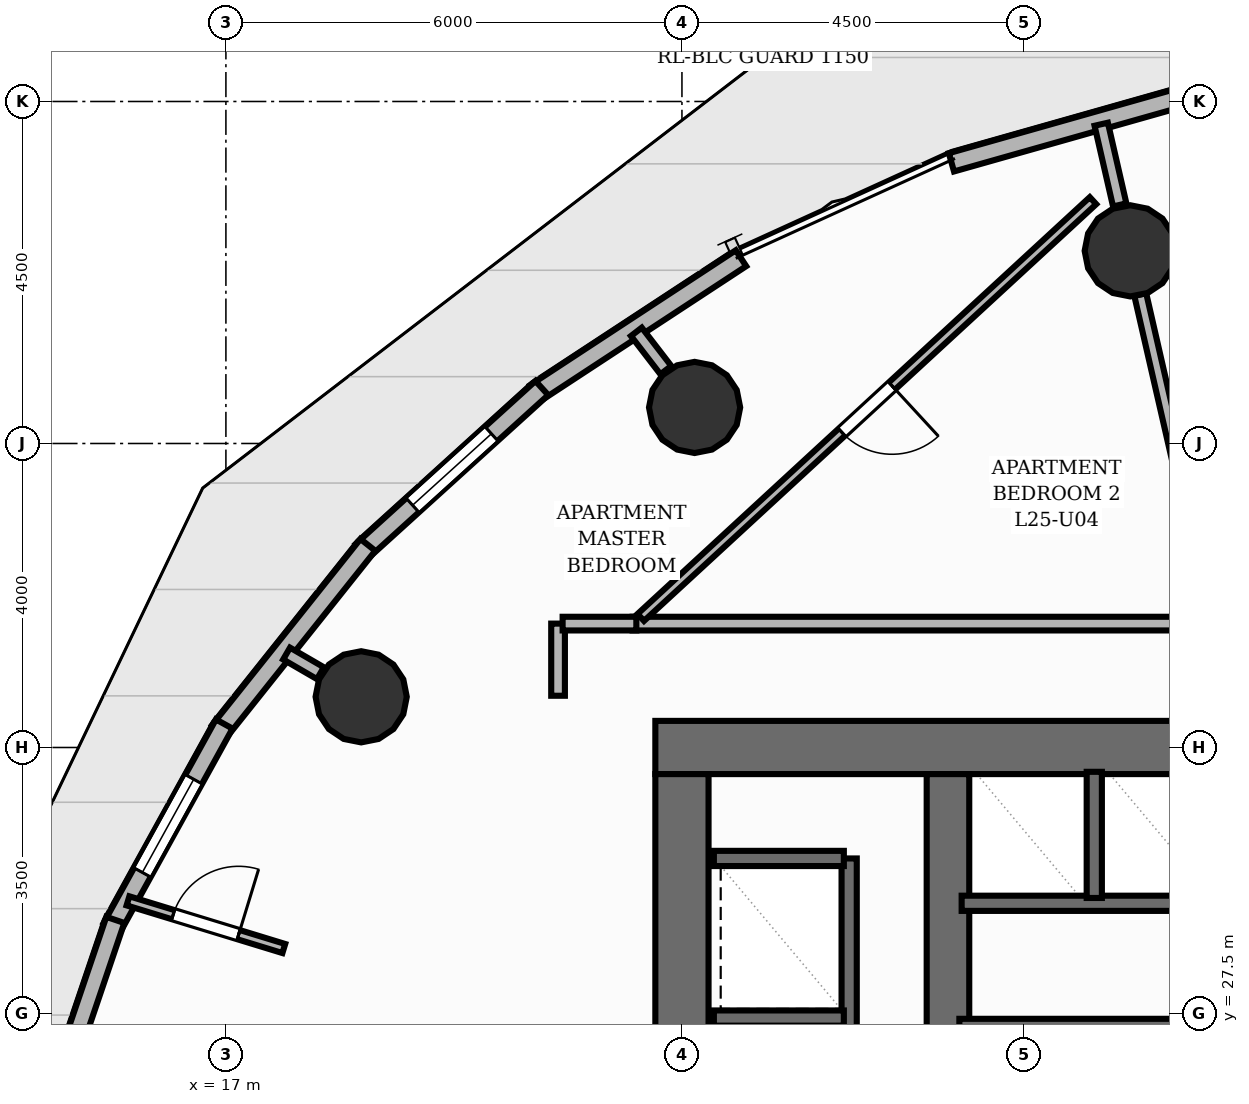
"""IFC4 building model, lengths in metres.
Left out: names, types, materials, properties, quantities, classifications, styles, units other than length and angle.
Written with IfcOpenShell. Run it as: python <this file> out.ifc"""

import sys

from ifc_helpers import new_model, si_unit, direction, frame, frame_2d, origin, origin_2d, place, context, subcontext, project, spatial, rectangle, circle, extrude, element, fill, save


model = new_model("IFC4")
c1 = context("Model", 3, precision=1e-05, world=origin(), true_north=direction((0.0, 1.0)))
c2 = subcontext(c1, "Body", "Model", "MODEL_VIEW")
j1 = project(units=[si_unit("LENGTHUNIT", "METRE"), si_unit("PLANEANGLEUNIT", "RADIAN")], contexts=[c1])
p1 = place(None, origin())
s1 = spatial("IfcSite", under=j1, at=p1, CompositionType="ELEMENT")
p2 = place(p1, origin())
s2 = spatial("IfcBuilding", under=s1, at=p2, CompositionType="ELEMENT")
p3 = place(p2, frame((0.0, 0.0, 86.88)))
s3 = spatial("IfcBuildingStorey", under=s2, at=p3, CompositionType="ELEMENT", Elevation=86.88)
p4 = place(p3, frame((22.65, 31.0, 0.0), z_axis=(0.0, 0.0, 1.0), x_axis=(1.0, 0.0, 0.0)))
e1 = element("IfcWall", 1, at=p4, inside=s3, PredefinedType="SHEAR", context=c2, shape_type="SweptSolid", body=[
    extrude(rectangle(XDim=18.7, YDim=0.7, at=frame_2d((9.35, 0.0))), origin(), (0.0, 0.0, 1.0), 3.2),
])
p5 = place(p4, frame((11.75, 0.0, 0.0)))
e2 = element("IfcOpeningElement", 2, at=p5, cuts=e1, PredefinedType="OPENING", context=c2, shape_type="SweptSolid", body=[
    extrude(rectangle(XDim=1.1, YDim=2.15, at=frame_2d((0.55, 1.075))), frame((0.0, 0.36, 0.0), z_axis=(0.0, -1.0, 0.0), x_axis=(1.0, 0.0, 0.0)), (0.0, 0.0, 1.0), 0.72),
])
p6 = place(p3, frame((23.0, 17.35, 0.0), z_axis=(0.0, 0.0, 1.0), x_axis=(0.0, 1.0, 0.0)))
e3 = element("IfcWall", 3, at=p6, inside=s3, PredefinedType="SHEAR", context=c2, shape_type="SweptSolid", body=[
    extrude(rectangle(XDim=13.3, YDim=0.7, at=frame_2d((6.65, 0.0))), origin(), (0.0, 0.0, 1.0), 3.2),
])
p7 = place(p3, frame((26.5, 17.35, 0.0), z_axis=(0.0, 0.0, 1.0), x_axis=(0.0, 1.0, 0.0)))
e4 = element("IfcWall", 4, at=p7, inside=s3, PredefinedType="SHEAR", context=c2, shape_type="SweptSolid", body=[
    extrude(rectangle(XDim=13.3, YDim=0.56, at=frame_2d((6.65, 0.0))), origin(), (0.0, 0.0, 1.0), 3.2),
])
for number, where, z_axis, x_axis in (
    (5, (28.898, 37.535, 0.0), (0.0, 0.0, 1.0), (1.0, 0.0, 0.0)),
    (6, (23.167, 35.474, 0.0), (0.0, 0.0, 1.0), (1.0, 0.0, 0.0)),
    (7, (18.78, 31.667, 0.0), (0.0, 0.0, 1.0), (1.0, 0.0, 0.0)),
):
    element("IfcColumn", number, at=place(p3, frame(where, z_axis=z_axis, x_axis=x_axis)), inside=s3, PredefinedType="COLUMN", context=c2, shape_type="SweptSolid", body=[
        extrude(circle(Radius=0.6, at=origin_2d()), origin(), (0.0, 0.0, 1.0), 3.2),
    ])
p8 = place(p3, frame((26.545, 38.699, 0.0), z_axis=(0.0, 0.0, 1.0), x_axis=(0.962134911526, 0.272573681825, 0.0)))
e8 = element("IfcWall", 8, at=p8, inside=s3, PredefinedType="SOLIDWALL", context=c2, shape_type="SweptSolid", body=[
    extrude(rectangle(XDim=3.26, YDim=0.25, at=frame_2d((1.63, 0.0))), origin(), (0.0, 0.0, 1.0), 2.96),
])
p9 = place(p3, frame((21.071, 35.663, 0.0), z_axis=(0.0, 0.0, 1.0), x_axis=(0.836273856728, 0.548311988336, 0.0)))
e9 = element("IfcWall", 9, at=p9, inside=s3, PredefinedType="SOLIDWALL", context=c2, shape_type="SweptSolid", body=[
    extrude(rectangle(XDim=3.236, YDim=0.25, at=frame_2d((1.618, 0.0))), origin(), (0.0, 0.0, 1.0), 2.96),
])
p10 = place(p3, frame((18.792, 33.586, 0.0), z_axis=(0.0, 0.0, 1.0), x_axis=(0.740832321657, 0.671690011232, 0.0)))
e10 = element("IfcWall", 10, at=p10, inside=s3, PredefinedType="SOLIDWALL", context=c2, shape_type="SweptSolid", body=[
    extrude(rectangle(XDim=3.192, YDim=0.25, at=frame_2d((1.596, 0.0))), origin(), (0.0, 0.0, 1.0), 2.96),
])
p11 = place(p10, frame((0.896, 0.0, 0.85)))
e11 = element("IfcOpeningElement", 11, at=p11, cuts=e10, PredefinedType="OPENING", context=c2, shape_type="SweptSolid", body=[
    extrude(rectangle(XDim=1.4, YDim=1.55, at=frame_2d((0.7, 0.775))), frame((0.0, 0.135, 0.0), z_axis=(0.0, -1.0, 0.0), x_axis=(1.0, 0.0, 0.0)), (0.0, 0.0, 1.0), 0.27),
])
p12 = place(p3, frame((16.916, 31.217, 0.0), z_axis=(0.0, 0.0, 1.0), x_axis=(0.623134406496, 0.782114768714, 0.0)))
e12 = element("IfcWall", 12, at=p12, inside=s3, PredefinedType="SOLIDWALL", context=c2, shape_type="SweptSolid", body=[
    extrude(rectangle(XDim=3.131, YDim=0.25, at=frame_2d((1.565, 0.0))), origin(), (0.0, 0.0, 1.0), 2.96),
])
p13 = place(p3, frame((15.5, 28.629, 0.0), z_axis=(0.0, 0.0, 1.0), x_axis=(0.482904421948, 0.875673066426, 0.0)))
e13 = element("IfcWall", 13, at=p13, inside=s3, PredefinedType="SOLIDWALL", context=c2, shape_type="SweptSolid", body=[
    extrude(rectangle(XDim=3.061, YDim=0.25, at=frame_2d((1.53, 0.0))), origin(), (0.0, 0.0, 1.0), 2.96),
])
p14 = place(p13, frame((0.83, 0.0, 0.85)))
e14 = element("IfcOpeningElement", 14, at=p14, cuts=e13, PredefinedType="OPENING", context=c2, shape_type="SweptSolid", body=[
    extrude(rectangle(XDim=1.4, YDim=1.55, at=frame_2d((0.7, 0.775))), frame((0.0, 0.135, 0.0), z_axis=(0.0, -1.0, 0.0), x_axis=(1.0, 0.0, 0.0)), (0.0, 0.0, 1.0), 0.27),
])
p15 = place(p3, frame((14.585, 25.901, 0.0), z_axis=(0.0, 0.0, 1.0), x_axis=(0.321149814784, 0.947028403198, 0.0)))
e15 = element("IfcWall", 15, at=p15, inside=s3, PredefinedType="SOLIDWALL", context=c2, shape_type="SweptSolid", body=[
    extrude(rectangle(XDim=2.988, YDim=0.25, at=frame_2d((1.494, 0.0))), origin(), (0.0, 0.0, 1.0), 2.96),
])
p16 = place(p3, frame((26.65, 27.33, 0.0), z_axis=(0.0, 0.0, 1.0), x_axis=(1.0, 0.0, 0.0)))
e16 = element("IfcWall", 16, at=p16, inside=s3, PredefinedType="SHEAR", context=c2, shape_type="SweptSolid", body=[
    extrude(rectangle(XDim=3.24, YDim=0.2, at=frame_2d((1.62, 0.0))), origin(), (0.0, 0.0, 1.0), 3.2),
])
p17 = place(p3, frame((25.2, 18.46, 0.0), z_axis=(0.0, 0.0, 1.0), x_axis=(0.0, 1.0, 0.0)))
e17 = element("IfcWall", 17, at=p17, inside=s3, PredefinedType="SHEAR", context=c2, shape_type="SweptSolid", body=[
    extrude(rectangle(XDim=11.08, YDim=0.2, at=frame_2d((5.54, 0.0))), origin(), (0.0, 0.0, 1.0), 3.2),
])
for number, where, z_axis, x_axis in (
    (18, (23.42, 29.54, 0.0), (0.0, 0.0, 1.0), (1.0, 0.0, 0.0)),
    (19, (23.42, 27.44, 0.0), (0.0, 0.0, 1.0), (1.0, 0.0, 0.0)),
):
    element("IfcWall", number, at=place(p3, frame(where, z_axis=z_axis, x_axis=x_axis)), inside=s3, PredefinedType="SHEAR", context=c2, shape_type="SweptSolid", body=[
        extrude(rectangle(XDim=1.71, YDim=0.2, at=frame_2d((0.855, 0.0))), origin(), (0.0, 0.0, 1.0), 3.2),
    ])
p18 = place(p3, frame((26.68, 28.95, 0.0), z_axis=(0.0, 0.0, 1.0), x_axis=(1.0, 0.0, 0.0)))
e20 = element("IfcWall", 20, at=p18, inside=s3, PredefinedType="SHEAR", context=c2, shape_type="SweptSolid", body=[
    extrude(rectangle(XDim=5.24, YDim=0.2, at=frame_2d((2.62, 0.0))), origin(), (0.0, 0.0, 1.0), 3.2),
])
p19 = place(p3, frame((28.425, 29.02, 0.0), z_axis=(0.0, 0.0, 1.0), x_axis=(0.0, 1.0, 0.0)))
e21 = element("IfcWall", 21, at=p19, inside=s3, PredefinedType="SHEAR", context=c2, shape_type="SweptSolid", body=[
    extrude(rectangle(XDim=1.66, YDim=0.2, at=frame_2d((0.83, 0.0))), origin(), (0.0, 0.0, 1.0), 3.2),
])
p20 = place(p3, frame((28.76, 38.139, 0.0), z_axis=(0.0, 0.0, 1.0), x_axis=(-0.223287406217, 0.974752652843, 0.0)))
e22 = element("IfcWall", 22, at=p20, inside=s3, PredefinedType="PARTITIONING", context=c2, shape_type="SweptSolid", body=[
    extrude(rectangle(XDim=1.089, YDim=0.18, at=frame_2d((0.544, 0.0))), origin(), (0.0, 0.0, 1.0), 2.261),
])
p21 = place(p3, frame((22.788, 35.966, 0.0), z_axis=(0.0, 0.0, 1.0), x_axis=(-0.609970610867, 0.792424036661, 0.0)))
e23 = element("IfcWall", 23, at=p21, inside=s3, PredefinedType="PARTITIONING", context=c2, shape_type="SweptSolid", body=[
    extrude(rectangle(XDim=0.635, YDim=0.18, at=frame_2d((0.318, 0.0))), origin(), (0.0, 0.0, 1.0), 2.261),
])
p22 = place(p3, frame((18.243, 31.978, 0.0), z_axis=(0.0, 0.0, 1.0), x_axis=(-0.864981735625, 0.501803344981, 0.0)))
e24 = element("IfcWall", 24, at=p22, inside=s3, PredefinedType="PARTITIONING", context=c2, shape_type="SweptSolid", body=[
    extrude(rectangle(XDim=0.514, YDim=0.18, at=frame_2d((0.257, 0.0))), origin(), (0.0, 0.0, 1.0), 2.261),
])
p23 = place(p3, frame((22.351, 32.63, 0.0), z_axis=(0.0, 0.0, 1.0), x_axis=(1.0, 0.0, 0.0)))
e25 = element("IfcWall", 25, at=p23, inside=s3, PredefinedType="PARTITIONING", context=c2, shape_type="SweptSolid", body=[
    extrude(rectangle(XDim=20.279, YDim=0.18, at=frame_2d((10.14, 0.0))), origin(), (0.0, 0.0, 1.0), 2.955),
])
p24 = place(p23, frame((11.378, 0.0, 0.0)))
e26 = element("IfcOpeningElement", 26, at=p24, cuts=e25, PredefinedType="OPENING", context=c2, shape_type="SweptSolid", body=[
    extrude(rectangle(XDim=1.05, YDim=2.15, at=frame_2d((0.525, 1.075))), frame((0.0, 0.1, 0.0), z_axis=(0.0, -1.0, 0.0), x_axis=(1.0, 0.0, 0.0)), (0.0, 0.0, 1.0), 0.2),
])
p25 = place(p3, frame((21.37, 31.681, 0.0), z_axis=(0.0, 0.0, 1.0), x_axis=(0.0, 1.0, 0.0)))
e27 = element("IfcWall", 27, at=p25, inside=s3, PredefinedType="PARTITIONING", context=c2, shape_type="SweptSolid", body=[
    extrude(rectangle(XDim=0.949, YDim=0.18, at=frame_2d((0.475, 0.0))), origin(), (0.0, 0.0, 1.0), 2.955),
])
p26 = place(p3, frame((21.43, 32.63, 0.0), z_axis=(0.0, 0.0, 1.0), x_axis=(1.0, 0.0, 0.0)))
e28 = element("IfcWall", 28, at=p26, inside=s3, PredefinedType="PARTITIONING", context=c2, shape_type="SweptSolid", body=[
    extrude(rectangle(XDim=0.97, YDim=0.18, at=frame_2d((0.485, 0.0))), origin(), (0.0, 0.0, 1.0), 2.955),
])
p27 = place(p3, frame((32.923, 35.293, 0.0), z_axis=(0.0, 0.0, 1.0), x_axis=(-0.994472124215, 0.105000924563, 0.0)))
e29 = element("IfcWall", 29, at=p27, inside=s3, PredefinedType="PLUMBINGWALL", context=c2, shape_type="SweptSolid", body=[
    extrude(rectangle(XDim=3.618, YDim=0.16, at=frame_2d((1.809, 0.0))), origin(), (0.0, 0.0, 1.0), 2.955),
])
p28 = place(p3, frame((30.022, 32.63, 0.0), z_axis=(0.0, 0.0, 1.0), x_axis=(-0.223321757884, 0.974744783241, 0.0)))
e30 = element("IfcWall", 30, at=p28, inside=s3, PredefinedType="PLUMBINGWALL", context=c2, shape_type="SweptSolid", body=[
    extrude(rectangle(XDim=4.442, YDim=0.16, at=frame_2d((2.221, 0.0))), origin(), (0.0, 0.0, 1.0), 2.261),
])
p29 = place(p3, frame((15.712, 28.982, 0.0), z_axis=(0.0, 0.0, 1.0), x_axis=(0.956248079097, -0.292557022175, 0.0)))
e31 = element("IfcWall", 31, at=p29, inside=s3, PredefinedType="PARTITIONING", context=c2, shape_type="SweptSolid", body=[
    extrude(rectangle(XDim=2.144, YDim=0.125, at=frame_2d((1.072, 0.0))), origin(), (0.0, 0.0, 1.0), 2.642),
])
p30 = place(p29, frame((0.622, 0.0, 0.0)))
e32 = element("IfcOpeningElement", 32, at=p30, cuts=e31, PredefinedType="OPENING", context=c2, shape_type="SweptSolid", body=[
    extrude(rectangle(XDim=0.9, YDim=2.1, at=frame_2d((0.45, 1.05))), frame((0.0, 0.073, 0.0), z_axis=(0.0, -1.0, 0.0), x_axis=(1.0, 0.0, 0.0)), (0.0, 0.0, 1.0), 0.145),
])
p31 = place(p3, frame((28.408, 38.195, 0.0), z_axis=(0.0, 0.0, 1.0), x_axis=(-0.735306461181, -0.677734762386, 0.0)))
e33 = element("IfcWall", 33, at=p31, inside=s3, PredefinedType="PARTITIONING", context=c2, shape_type="SweptSolid", body=[
    extrude(rectangle(XDim=8.091, YDim=0.125, at=frame_2d((4.045, 0.0))), origin(), (0.0, 0.0, 1.0), 2.404),
])
p32 = place(p31, frame((3.596, 0.0, 0.0)))
e34 = element("IfcOpeningElement", 34, at=p32, cuts=e33, PredefinedType="OPENING", context=c2, shape_type="SweptSolid", body=[
    extrude(rectangle(XDim=0.9, YDim=2.1, at=frame_2d((0.45, 1.05))), frame((0.0, 0.073, 0.0), z_axis=(0.0, -1.0, 0.0), x_axis=(1.0, 0.0, 0.0)), (0.0, 0.0, 1.0), 0.145),
])
p33 = place(p11, origin())
e35 = element("IfcWindow", 35, at=p33, inside=s3, PartitioningType="SINGLE_PANEL", PredefinedType="WINDOW", context=c2, shape_type="SweptSolid", body=[
    extrude(rectangle(XDim=1.4, YDim=1.55, at=frame_2d((0.7, 0.775))), frame((0.0, 0.03, 0.0), z_axis=(0.0, -1.0, 0.0), x_axis=(1.0, 0.0, 0.0)), (0.0, 0.0, 1.0), 0.06),
])
fill(e11, e35)
p34 = place(p14, origin())
e36 = element("IfcWindow", 36, at=p34, inside=s3, PartitioningType="SINGLE_PANEL", PredefinedType="WINDOW", context=c2, shape_type="SweptSolid", body=[
    extrude(rectangle(XDim=1.4, YDim=1.55, at=frame_2d((0.7, 0.775))), frame((0.0, 0.03, 0.0), z_axis=(0.0, -1.0, 0.0), x_axis=(1.0, 0.0, 0.0)), (0.0, 0.0, 1.0), 0.06),
])
fill(e14, e36)
p35 = place(p30, origin())
e37 = element("IfcDoor", 37, at=p35, inside=s3, OperationType="SINGLE_SWING_RIGHT", PredefinedType="DOOR", context=c2, shape_type="SweptSolid", body=[
    extrude(rectangle(XDim=0.9, YDim=2.1, at=frame_2d((0.45, 1.05))), frame((0.0, 0.025, 0.0), z_axis=(0.0, -1.0, 0.0), x_axis=(1.0, 0.0, 0.0)), (0.0, 0.0, 1.0), 0.05),
])
fill(e32, e37)
p36 = place(p32, origin())
e38 = element("IfcDoor", 38, at=p36, inside=s3, OperationType="SINGLE_SWING_LEFT", PredefinedType="DOOR", context=c2, shape_type="SweptSolid", body=[
    extrude(rectangle(XDim=0.9, YDim=2.1, at=frame_2d((0.45, 1.05))), frame((0.0, 0.025, 0.0), z_axis=(0.0, -1.0, 0.0), x_axis=(1.0, 0.0, 0.0)), (0.0, 0.0, 1.0), 0.05),
])
fill(e34, e38)
save(model, sys.argv[1])
